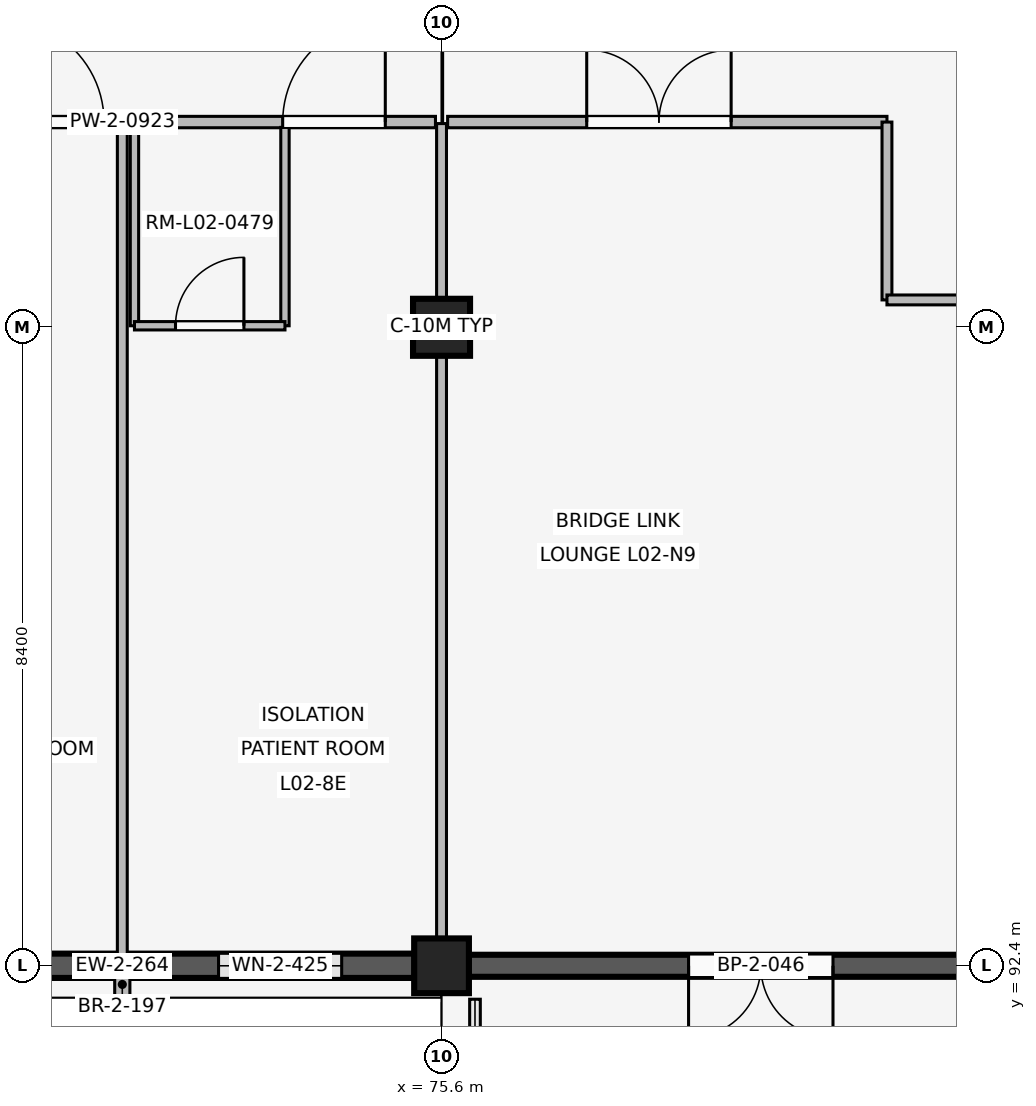
"""IFC4 building model, lengths in metres.
Left out: names, types, materials, properties, quantities, classifications, styles, units other than length and angle.
Written with IfcOpenShell. Run it as: python <this file> out.ifc"""

import sys

from ifc_helpers import new_model, si_unit, direction, frame, frame_2d, origin, origin_2d, place, context, subcontext, project, spatial, rectangle, extrude, element, fill, save


model = new_model("IFC4")
c1 = context("Model", 3, precision=1e-05, world=origin(), true_north=direction((0.0, 1.0)))
c2 = subcontext(c1, "Body", "Model", "MODEL_VIEW")
j1 = project(units=[si_unit("LENGTHUNIT", "METRE"), si_unit("PLANEANGLEUNIT", "RADIAN")], contexts=[c1])
p1 = place(None, origin())
s1 = spatial("IfcSite", under=j1, at=p1, CompositionType="ELEMENT")
p2 = place(p1, origin())
s2 = spatial("IfcBuilding", under=s1, at=p2, CompositionType="ELEMENT")
p3 = place(p2, frame((0.0, 0.0, 8.1)))
s3 = spatial("IfcBuildingStorey", under=s2, at=p3, CompositionType="ELEMENT", Elevation=8.1)
p4 = place(p3, frame((75.6, 92.4, 0.0), z_axis=(0.0, 0.0, 1.0), x_axis=(1.0, 0.0, 0.0)))
e1 = element("IfcColumn", 1, at=p4, inside=s3, PredefinedType="COLUMN", context=c2, shape_type="SweptSolid", body=[
    extrude(rectangle(XDim=0.72, YDim=0.72, at=origin_2d()), origin(), (0.0, 0.0, 1.0), 4.8),
])
p5 = place(p3, frame((75.6, 100.8, 0.0), z_axis=(0.0, 0.0, 1.0), x_axis=(1.0, 0.0, 0.0)))
e2 = element("IfcColumn", 2, at=p5, inside=s3, PredefinedType="COLUMN", context=c2, shape_type="SweptSolid", body=[
    extrude(rectangle(XDim=0.75, YDim=0.75, at=origin_2d()), origin(), (0.0, 0.0, 1.0), 4.8),
])
p6 = place(p3, frame((75.245, 92.4, 0.0), z_axis=(0.0, 0.0, 1.0), x_axis=(-1.0, 0.0, 0.0)))
e3 = element("IfcWall", 3, at=p6, inside=s3, PredefinedType="SOLIDWALL", context=c2, shape_type="SweptSolid", body=[
    extrude(rectangle(XDim=7.69, YDim=0.32, at=frame_2d((3.845, 0.0))), origin(), (0.0, 0.0, 1.0), 3.86),
])
p7 = place(p6, frame((0.959, 0.0, 0.85)))
e4 = element("IfcOpeningElement", 4, at=p7, cuts=e3, PredefinedType="OPENING", context=c2, shape_type="SweptSolid", body=[
    extrude(rectangle(XDim=1.62, YDim=1.52, at=frame_2d((0.81, 0.76))), frame((0.0, 0.17, 0.0), z_axis=(0.0, -1.0, 0.0), x_axis=(1.0, 0.0, 0.0)), (0.0, 0.0, 1.0), 0.34),
])
p8 = place(p6, frame((5.111, 0.0, 0.85)))
e5 = element("IfcOpeningElement", 5, at=p8, cuts=e3, PredefinedType="OPENING", context=c2, shape_type="SweptSolid", body=[
    extrude(rectangle(XDim=1.62, YDim=1.52, at=frame_2d((0.81, 0.76))), frame((0.0, 0.17, 0.0), z_axis=(0.0, -1.0, 0.0), x_axis=(1.0, 0.0, 0.0)), (0.0, 0.0, 1.0), 0.34),
])
p9 = place(p3, frame((71.4, 92.325, 0.0), z_axis=(0.0, 0.0, 1.0), x_axis=(0.0, -1.0, 0.0)))
e6 = element("IfcWall", 6, at=p9, inside=s3, PredefinedType="ELEMENTEDWALL", context=c2, shape_type="SweptSolid", body=[
    extrude(rectangle(XDim=0.34, YDim=0.2, at=frame_2d((0.17, 0.0))), origin(), (0.0, 0.0, 1.0), 3.84),
])
p10 = place(p3, frame((83.645, 92.4, 0.0), z_axis=(0.0, 0.0, 1.0), x_axis=(-1.0, 0.0, 0.0)))
e7 = element("IfcWall", 7, at=p10, inside=s3, PredefinedType="SOLIDWALL", context=c2, shape_type="SweptSolid", body=[
    extrude(rectangle(XDim=7.69, YDim=0.29, at=frame_2d((3.845, 0.0))), origin(), (0.0, 0.0, 1.0), 3.86),
])
p11 = place(p10, frame((2.895, 0.0, 0.0)))
e8 = element("IfcOpeningElement", 8, at=p11, cuts=e7, PredefinedType="OPENING", context=c2, shape_type="SweptSolid", body=[
    extrude(rectangle(XDim=1.9, YDim=2.4, at=frame_2d((0.95, 1.2))), frame((0.0, 0.155, 0.0), z_axis=(0.0, -1.0, 0.0), x_axis=(1.0, 0.0, 0.0)), (0.0, 0.0, 1.0), 0.31),
])
p12 = place(p3, frame((67.28, 103.5, 0.0), z_axis=(0.0, 0.0, 1.0), x_axis=(1.0, 0.0, 0.0)))
e9 = element("IfcWall", 9, at=p12, inside=s3, PredefinedType="PARTITIONING", context=c2, shape_type="SweptSolid", body=[
    extrude(rectangle(XDim=8.24, YDim=0.15, at=frame_2d((4.12, 0.0))), origin(), (0.0, 0.0, 1.0), 3.84),
])
p13 = place(p12, frame((2.53, 0.0, 0.0)))
e10 = element("IfcOpeningElement", 10, at=p13, cuts=e9, PredefinedType="OPENING", context=c2, shape_type="SweptSolid", body=[
    extrude(rectangle(XDim=1.35, YDim=2.25, at=frame_2d((0.675, 1.125))), frame((0.0, 0.085, 0.0), z_axis=(0.0, -1.0, 0.0), x_axis=(1.0, 0.0, 0.0)), (0.0, 0.0, 1.0), 0.17),
])
p14 = place(p12, frame((6.23, 0.0, 0.0)))
e11 = element("IfcOpeningElement", 11, at=p14, cuts=e9, PredefinedType="OPENING", context=c2, shape_type="SweptSolid", body=[
    extrude(rectangle(XDim=1.35, YDim=2.25, at=frame_2d((0.675, 1.125))), frame((0.0, 0.085, 0.0), z_axis=(0.0, -1.0, 0.0), x_axis=(1.0, 0.0, 0.0)), (0.0, 0.0, 1.0), 0.17),
])
p15 = place(p3, frame((71.4, 92.5, 0.0), z_axis=(0.0, 0.0, 1.0), x_axis=(0.0, 1.0, 0.0)))
e12 = element("IfcWall", 12, at=p15, inside=s3, PredefinedType="PARTITIONING", context=c2, shape_type="SweptSolid", body=[
    extrude(rectangle(XDim=10.93, YDim=0.13, at=frame_2d((5.465, 0.0))), origin(), (0.0, 0.0, 1.0), 3.84),
])
for number, where, z_axis, x_axis in (
    (13, (71.56, 100.82, 0.0), (0.0, 0.0, 1.0), (0.0, 1.0, 0.0)),
    (14, (73.54, 100.82, 0.0), (0.0, 0.0, 1.0), (0.0, 1.0, 0.0)),
):
    element("IfcWall", number, at=place(p3, frame(where, z_axis=z_axis, x_axis=x_axis)), inside=s3, PredefinedType="PARTITIONING", context=c2, shape_type="SweptSolid", body=[
        extrude(rectangle(XDim=2.61, YDim=0.11, at=frame_2d((1.305, 0.0))), origin(), (0.0, 0.0, 1.0), 3.84),
    ])
p16 = place(p3, frame((71.56, 100.82, 0.0), z_axis=(0.0, 0.0, 1.0), x_axis=(1.0, 0.0, 0.0)))
e15 = element("IfcWall", 15, at=p16, inside=s3, PredefinedType="PARTITIONING", context=c2, shape_type="SweptSolid", body=[
    extrude(rectangle(XDim=1.98, YDim=0.11, at=frame_2d((0.99, 0.0))), origin(), (0.0, 0.0, 1.0), 3.84),
])
p17 = place(p16, frame((0.54, 0.0, 0.0)))
e16 = element("IfcOpeningElement", 16, at=p17, cuts=e15, PredefinedType="OPENING", context=c2, shape_type="SweptSolid", body=[
    extrude(rectangle(XDim=0.9, YDim=2.1, at=frame_2d((0.45, 1.05))), frame((0.0, 0.065, 0.0), z_axis=(0.0, -1.0, 0.0), x_axis=(1.0, 0.0, 0.0)), (0.0, 0.0, 1.0), 0.13),
])
p18 = place(p3, frame((75.6, 92.54, 0.0), z_axis=(0.0, 0.0, 1.0), x_axis=(0.0, 1.0, 0.0)))
e17 = element("IfcWall", 17, at=p18, inside=s3, PredefinedType="PARTITIONING", context=c2, shape_type="SweptSolid", body=[
    extrude(rectangle(XDim=10.94, YDim=0.13, at=frame_2d((5.47, 0.0))), origin(), (0.0, 0.0, 1.0), 3.84),
])
p19 = place(p3, frame((75.68, 103.5, 0.0), z_axis=(0.0, 0.0, 1.0), x_axis=(1.0, 0.0, 0.0)))
e18 = element("IfcWall", 18, at=p19, inside=s3, PredefinedType="PARTITIONING", context=c2, shape_type="SweptSolid", body=[
    extrude(rectangle(XDim=5.78, YDim=0.15, at=frame_2d((2.89, 0.0))), origin(), (0.0, 0.0, 1.0), 3.84),
])
p20 = place(p19, frame((1.83, 0.0, 0.0)))
e19 = element("IfcOpeningElement", 19, at=p20, cuts=e18, PredefinedType="OPENING", context=c2, shape_type="SweptSolid", body=[
    extrude(rectangle(XDim=1.9, YDim=2.4, at=frame_2d((0.95, 1.2))), frame((0.0, 0.085, 0.0), z_axis=(0.0, -1.0, 0.0), x_axis=(1.0, 0.0, 0.0)), (0.0, 0.0, 1.0), 0.17),
])
p21 = place(p3, frame((81.46, 101.16, 0.0), z_axis=(0.0, 0.0, 1.0), x_axis=(0.0, 1.0, 0.0)))
e20 = element("IfcWall", 20, at=p21, inside=s3, PredefinedType="PARTITIONING", context=c2, shape_type="SweptSolid", body=[
    extrude(rectangle(XDim=2.34, YDim=0.13, at=frame_2d((1.17, 0.0))), origin(), (0.0, 0.0, 1.0), 3.84),
])
p22 = place(p3, frame((81.46, 101.16, 0.0), z_axis=(0.0, 0.0, 1.0), x_axis=(1.0, 0.0, 0.0)))
e21 = element("IfcWall", 21, at=p22, inside=s3, PredefinedType="PARTITIONING", context=c2, shape_type="SweptSolid", body=[
    extrude(rectangle(XDim=2.18, YDim=0.13, at=frame_2d((1.09, 0.0))), origin(), (0.0, 0.0, 1.0), 3.84),
])
p23 = place(p7, origin())
e22 = element("IfcWindow", 22, at=p23, inside=s3, PartitioningType="SINGLE_PANEL", PredefinedType="WINDOW", context=c2, shape_type="SweptSolid", body=[
    extrude(rectangle(XDim=1.62, YDim=1.52, at=frame_2d((0.81, 0.76))), frame((0.0, 0.03, 0.0), z_axis=(0.0, -1.0, 0.0), x_axis=(1.0, 0.0, 0.0)), (0.0, 0.0, 1.0), 0.06),
])
fill(e4, e22)
p24 = place(p11, origin())
e23 = element("IfcDoor", 23, at=p24, inside=s3, OperationType="DOUBLE_SWING_LEFT", PredefinedType="DOOR", context=c2, shape_type="SweptSolid", body=[
    extrude(rectangle(XDim=1.9, YDim=2.4, at=frame_2d((0.95, 1.2))), frame((0.0, 0.025, 0.0), z_axis=(0.0, -1.0, 0.0), x_axis=(1.0, 0.0, 0.0)), (0.0, 0.0, 1.0), 0.05),
])
fill(e8, e23)
p25 = place(p13, origin())
e24 = element("IfcDoor", 24, at=p25, inside=s3, OperationType="SINGLE_SWING_LEFT", PredefinedType="DOOR", context=c2, shape_type="SweptSolid", body=[
    extrude(rectangle(XDim=1.35, YDim=2.25, at=frame_2d((0.675, 1.125))), frame((0.0, 0.025, 0.0), z_axis=(0.0, -1.0, 0.0), x_axis=(1.0, 0.0, 0.0)), (0.0, 0.0, 1.0), 0.05),
])
fill(e10, e24)
p26 = place(p14, origin())
e25 = element("IfcDoor", 25, at=p26, inside=s3, OperationType="SINGLE_SWING_RIGHT", PredefinedType="DOOR", context=c2, shape_type="SweptSolid", body=[
    extrude(rectangle(XDim=1.35, YDim=2.25, at=frame_2d((0.675, 1.125))), frame((0.0, 0.025, 0.0), z_axis=(0.0, -1.0, 0.0), x_axis=(1.0, 0.0, 0.0)), (0.0, 0.0, 1.0), 0.05),
])
fill(e11, e25)
p27 = place(p17, origin())
e26 = element("IfcDoor", 26, at=p27, inside=s3, OperationType="SINGLE_SWING_RIGHT", PredefinedType="DOOR", context=c2, shape_type="SweptSolid", body=[
    extrude(rectangle(XDim=0.9, YDim=2.1, at=frame_2d((0.45, 1.05))), frame((0.0, 0.025, 0.0), z_axis=(0.0, -1.0, 0.0), x_axis=(1.0, 0.0, 0.0)), (0.0, 0.0, 1.0), 0.05),
])
fill(e16, e26)
p28 = place(p20, origin())
e27 = element("IfcDoor", 27, at=p28, inside=s3, OperationType="DOUBLE_SWING_LEFT", PredefinedType="DOOR", context=c2, shape_type="SweptSolid", body=[
    extrude(rectangle(XDim=1.9, YDim=2.4, at=frame_2d((0.95, 1.2))), frame((0.0, 0.025, 0.0), z_axis=(0.0, -1.0, 0.0), x_axis=(1.0, 0.0, 0.0)), (0.0, 0.0, 1.0), 0.05),
])
fill(e19, e27)
save(model, sys.argv[1])
